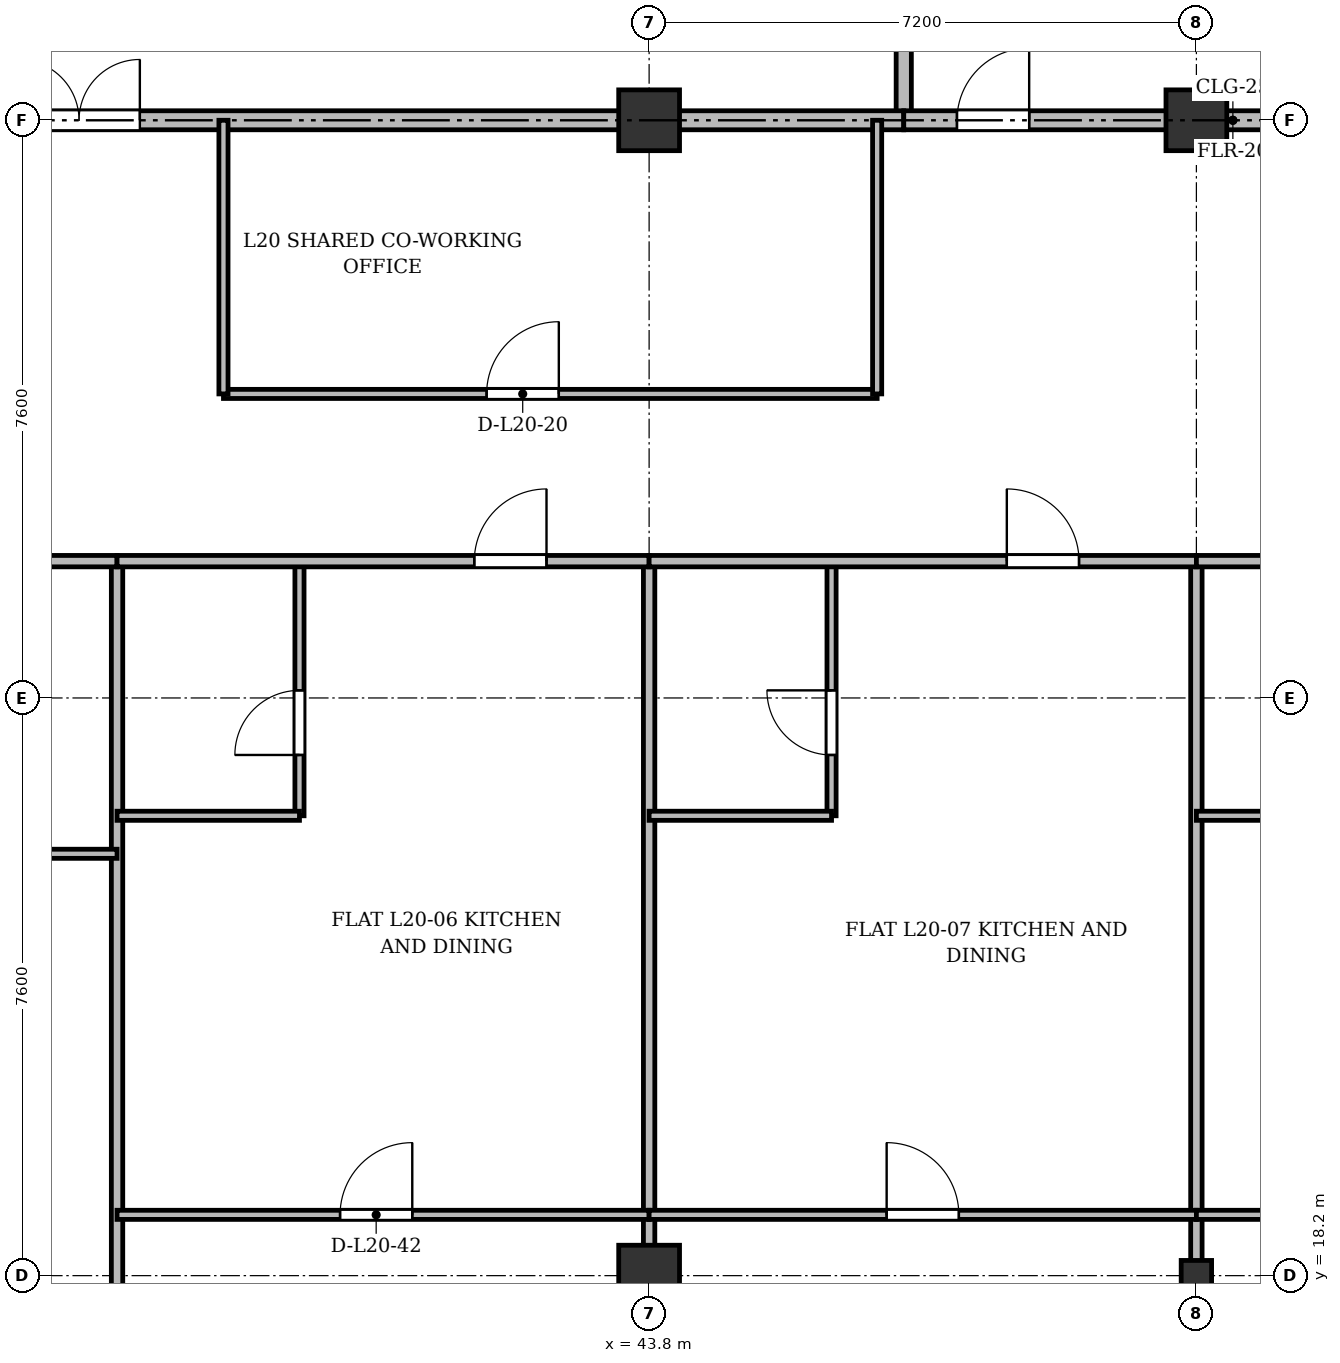
"""IFC4 building model, lengths in metres.
Left out: names, types, materials, properties, quantities, classifications, styles, units other than length and angle.
Written with IfcOpenShell. Run it as: python <this file> out.ifc"""

import sys

from ifc_helpers import new_model, si_unit, direction, frame, frame_2d, origin, origin_2d, place, context, subcontext, project, spatial, rectangle, i_section, extrude, source, transform, mapped, element, fill, save


model = new_model("IFC4")
c1 = context("Model", 3, precision=1e-05, world=origin(), true_north=direction((0.0, 1.0)))
c2 = subcontext(c1, "Body", "Model", "MODEL_VIEW")
j1 = project(units=[si_unit("LENGTHUNIT", "METRE"), si_unit("PLANEANGLEUNIT", "RADIAN")], contexts=[c1])
p1 = place(None, origin())
s1 = spatial("IfcSite", under=j1, at=p1, CompositionType="ELEMENT")
p2 = place(p1, origin())
s2 = spatial("IfcBuilding", under=s1, at=p2, CompositionType="ELEMENT")
p3 = place(p2, frame((0.0, 0.0, 81.7)))
s3 = spatial("IfcBuildingStorey", under=s2, at=p3, CompositionType="ELEMENT", Elevation=81.7)
m1 = source(origin(), c2, "Body", "SweptSolid", [
    extrude(rectangle(XDim=0.8, YDim=0.8, at=origin_2d()), origin(), (0.0, 0.0, 1.0), 3.6),
])
for number, where, z_axis, x_axis in (
    (1, (43.8, 18.2, 0.0), (0.0, 0.0, 1.0), (1.0, 0.0, 0.0)),
    (2, (43.8, 33.4, 0.0), (0.0, 0.0, 1.0), (1.0, 0.0, 0.0)),
):
    element("IfcColumn", number, at=place(p3, frame(where, z_axis=z_axis, x_axis=x_axis)), inside=s3, PredefinedType="COLUMN", context=c2, shape_type="MappedRepresentation", body=[
        mapped(m1, transform((0.0, 0.0, 0.0), x_axis=(1.0, 0.0, 0.0), y_axis=(0.0, 1.0, 0.0), z_axis=(0.0, 0.0, 1.0), scale=1.0)),
    ])
m2 = source(origin(), c2, "Body", "SweptSolid", [
    extrude(i_section(OverallWidth=0.4, OverallDepth=0.4, WebThickness=0.022, FlangeThickness=0.035, at=origin_2d()), origin(), (0.0, 0.0, 1.0), 3.6),
])
p4 = place(p3, frame((51.0, 18.2, 0.0), z_axis=(0.0, 0.0, 1.0), x_axis=(1.0, 0.0, 0.0)))
e3 = element("IfcColumn", 3, at=p4, inside=s3, PredefinedType="COLUMN", context=c2, shape_type="MappedRepresentation", body=[
    mapped(m2, transform((0.0, 0.0, 0.0), x_axis=(1.0, 0.0, 0.0), y_axis=(0.0, 1.0, 0.0), z_axis=(0.0, 0.0, 1.0), scale=1.0)),
])
p5 = place(p3, frame((51.0, 33.4, 0.0), z_axis=(0.0, 0.0, 1.0), x_axis=(1.0, 0.0, 0.0)))
e4 = element("IfcColumn", 4, at=p5, inside=s3, PredefinedType="COLUMN", context=c2, shape_type="MappedRepresentation", body=[
    mapped(m1, transform((0.0, 0.0, 0.0), x_axis=(1.0, 0.0, 0.0), y_axis=(0.0, 1.0, 0.0), z_axis=(0.0, 0.0, 1.0), scale=1.0)),
])
p6 = place(p3, frame((47.15, 33.4, 0.0), z_axis=(0.0, 0.0, 1.0), x_axis=(0.0, 1.0, 0.0)))
e5 = element("IfcWall", 5, at=p6, inside=s3, PredefinedType="SOLIDWALL", context=c2, shape_type="SweptSolid", body=[
    extrude(rectangle(XDim=11.3, YDim=0.2, at=frame_2d((5.65, 0.0))), origin(), (0.0, 0.0, 1.0), 2.752),
])
p7 = place(p3, frame((26.3, 33.4, 0.0), z_axis=(0.0, 0.0, 1.0), x_axis=(1.0, 0.0, 0.0)))
e6 = element("IfcWall", 6, at=p7, inside=s3, PredefinedType="PARTITIONING", context=c2, shape_type="SweptSolid", body=[
    extrude(rectangle(XDim=20.85, YDim=0.25, at=frame_2d((10.425, 0.0))), origin(), (0.0, 0.0, 1.0), 2.752),
])
p8 = place(p7, frame((9.2, 0.0, 0.0)))
e7 = element("IfcOpeningElement", 7, at=p8, cuts=e6, PredefinedType="OPENING", context=c2, shape_type="SweptSolid", body=[
    extrude(rectangle(XDim=1.6, YDim=2.2, at=frame_2d((0.8, 1.1))), frame((0.0, 0.135, 0.0), z_axis=(0.0, -1.0, 0.0), x_axis=(1.0, 0.0, 0.0)), (0.0, 0.0, 1.0), 0.27),
])
p9 = place(p3, frame((47.15, 33.4, 0.0), z_axis=(0.0, 0.0, 1.0), x_axis=(1.0, 0.0, 0.0)))
e8 = element("IfcWall", 8, at=p9, inside=s3, PredefinedType="PARTITIONING", context=c2, shape_type="SweptSolid", body=[
    extrude(rectangle(XDim=11.15, YDim=0.25, at=frame_2d((5.575, 0.0))), origin(), (0.0, 0.0, 1.0), 2.752),
])
p10 = place(p9, frame((0.7, 0.0, 0.0)))
e9 = element("IfcOpeningElement", 9, at=p10, cuts=e8, PredefinedType="OPENING", context=c2, shape_type="SweptSolid", body=[
    extrude(rectangle(XDim=0.95, YDim=2.15, at=frame_2d((0.475, 1.075))), frame((0.0, 0.135, 0.0), z_axis=(0.0, -1.0, 0.0), x_axis=(1.0, 0.0, 0.0)), (0.0, 0.0, 1.0), 0.27),
])
p11 = place(p9, frame((6.0, 0.0, 0.0)))
e10 = element("IfcOpeningElement", 10, at=p11, cuts=e8, PredefinedType="OPENING", context=c2, shape_type="SweptSolid", body=[
    extrude(rectangle(XDim=1.2, YDim=2.15, at=frame_2d((0.6, 1.075))), frame((0.0, 0.135, 0.0), z_axis=(0.0, -1.0, 0.0), x_axis=(1.0, 0.0, 0.0)), (0.0, 0.0, 1.0), 0.27),
])
p12 = place(p3, frame((38.2, 29.8, 0.0), z_axis=(0.0, 0.0, 1.0), x_axis=(1.0, 0.0, 0.0)))
e11 = element("IfcWall", 11, at=p12, inside=s3, PredefinedType="PARTITIONING", context=c2, shape_type="SweptSolid", body=[
    extrude(rectangle(XDim=8.6, YDim=0.12, at=frame_2d((4.3, 0.0))), origin(), (0.0, 0.0, 1.0), 2.84),
])
p13 = place(p12, frame((3.462, 0.0, 0.0)))
e12 = element("IfcOpeningElement", 12, at=p13, cuts=e11, PredefinedType="OPENING", context=c2, shape_type="SweptSolid", body=[
    extrude(rectangle(XDim=0.95, YDim=2.15, at=frame_2d((0.475, 1.075))), frame((0.0, 0.07, 0.0), z_axis=(0.0, -1.0, 0.0), x_axis=(1.0, 0.0, 0.0)), (0.0, 0.0, 1.0), 0.14),
])
for number, where, z_axis, x_axis in (
    (13, (38.2, 29.8, 0.0), (0.0, 0.0, 1.0), (0.0, 1.0, 0.0)),
    (14, (46.8, 29.8, 0.0), (0.0, 0.0, 1.0), (0.0, 1.0, 0.0)),
):
    element("IfcWall", number, at=place(p3, frame(where, z_axis=z_axis, x_axis=x_axis)), inside=s3, PredefinedType="PARTITIONING", context=c2, shape_type="SweptSolid", body=[
        extrude(rectangle(XDim=3.6, YDim=0.12, at=frame_2d((1.8, 0.0))), origin(), (0.0, 0.0, 1.0), 2.752),
    ])
p14 = place(p3, frame((36.8, 3.145, 0.0), z_axis=(0.0, 0.0, 1.0), x_axis=(0.0, 1.0, 0.0)))
e15 = element("IfcWall", 15, at=p14, inside=s3, PredefinedType="PARTITIONING", context=c2, shape_type="SweptSolid", body=[
    extrude(rectangle(XDim=24.455, YDim=0.15, at=frame_2d((12.228, 0.0))), origin(), (0.0, 0.0, 1.0), 2.752),
])
for number, where, z_axis, x_axis in (
    (16, (43.8, 3.145, 0.0), (0.0, 0.0, 1.0), (0.0, 1.0, 0.0)),
    (17, (51.0, 3.145, 0.0), (0.0, 0.0, 1.0), (0.0, 1.0, 0.0)),
):
    element("IfcWall", number, at=place(p3, frame(where, z_axis=z_axis, x_axis=x_axis)), inside=s3, PredefinedType="PARTITIONING", context=c2, shape_type="SweptSolid", body=[
        extrude(rectangle(XDim=24.455, YDim=0.15, at=frame_2d((12.228, 0.0))), origin(), (0.0, 0.0, 1.0), 2.84),
    ])
p15 = place(p3, frame((30.6, 27.6, 0.0), z_axis=(0.0, 0.0, 1.0), x_axis=(1.0, 0.0, 0.0)))
e18 = element("IfcWall", 18, at=p15, inside=s3, PredefinedType="PARTITIONING", context=c2, shape_type="SweptSolid", body=[
    extrude(rectangle(XDim=6.2, YDim=0.15, at=frame_2d((3.1, 0.0))), origin(), (0.0, 0.0, 1.0), 2.84),
])
p16 = place(p15, frame((2.625, 0.0, 0.0)))
e19 = element("IfcOpeningElement", 19, at=p16, cuts=e18, PredefinedType="OPENING", context=c2, shape_type="SweptSolid", body=[
    extrude(rectangle(XDim=0.95, YDim=2.15, at=frame_2d((0.475, 1.075))), frame((0.0, 0.085, 0.0), z_axis=(0.0, -1.0, 0.0), x_axis=(1.0, 0.0, 0.0)), (0.0, 0.0, 1.0), 0.17),
])
p17 = place(p3, frame((30.6, 23.75, 0.0), z_axis=(0.0, 0.0, 1.0), x_axis=(1.0, 0.0, 0.0)))
e20 = element("IfcWall", 20, at=p17, inside=s3, PredefinedType="PARTITIONING", context=c2, shape_type="SweptSolid", body=[
    extrude(rectangle(XDim=6.2, YDim=0.12, at=frame_2d((3.1, 0.0))), origin(), (0.0, 0.0, 1.0), 2.84),
])
p18 = place(p17, frame((2.625, 0.0, 0.0)))
e21 = element("IfcOpeningElement", 21, at=p18, cuts=e20, PredefinedType="OPENING", context=c2, shape_type="SweptSolid", body=[
    extrude(rectangle(XDim=0.95, YDim=2.15, at=frame_2d((0.475, 1.075))), frame((0.0, 0.07, 0.0), z_axis=(0.0, -1.0, 0.0), x_axis=(1.0, 0.0, 0.0)), (0.0, 0.0, 1.0), 0.14),
])
p19 = place(p3, frame((36.8, 19.0, 0.0), z_axis=(0.0, 0.0, 1.0), x_axis=(1.0, 0.0, 0.0)))
e22 = element("IfcWall", 22, at=p19, inside=s3, PredefinedType="PARTITIONING", context=c2, shape_type="SweptSolid", body=[
    extrude(rectangle(XDim=7.0, YDim=0.12, at=frame_2d((3.5, 0.0))), origin(), (0.0, 0.0, 1.0), 2.84),
])
p20 = place(p19, frame((2.934, 0.0, 0.0)))
e23 = element("IfcOpeningElement", 23, at=p20, cuts=e22, PredefinedType="OPENING", context=c2, shape_type="SweptSolid", body=[
    extrude(rectangle(XDim=0.95, YDim=2.15, at=frame_2d((0.475, 1.075))), frame((0.0, 0.07, 0.0), z_axis=(0.0, -1.0, 0.0), x_axis=(1.0, 0.0, 0.0)), (0.0, 0.0, 1.0), 0.14),
])
p21 = place(p3, frame((39.2, 24.25, 0.0), z_axis=(0.0, 0.0, 1.0), x_axis=(0.0, 1.0, 0.0)))
e24 = element("IfcWall", 24, at=p21, inside=s3, PredefinedType="PARTITIONING", context=c2, shape_type="SweptSolid", body=[
    extrude(rectangle(XDim=3.35, YDim=0.12, at=frame_2d((1.675, 0.0))), origin(), (0.0, 0.0, 1.0), 2.99),
])
p22 = place(p21, frame((0.8, 0.0, 0.0)))
e25 = element("IfcOpeningElement", 25, at=p22, cuts=e24, PredefinedType="OPENING", context=c2, shape_type="SweptSolid", body=[
    extrude(rectangle(XDim=0.85, YDim=2.1, at=frame_2d((0.425, 1.05))), frame((0.0, 0.07, 0.0), z_axis=(0.0, -1.0, 0.0), x_axis=(1.0, 0.0, 0.0)), (0.0, 0.0, 1.0), 0.14),
])
p23 = place(p3, frame((36.8, 24.25, 0.0), z_axis=(0.0, 0.0, 1.0), x_axis=(1.0, 0.0, 0.0)))
e26 = element("IfcWall", 26, at=p23, inside=s3, PredefinedType="PARTITIONING", context=c2, shape_type="SweptSolid", body=[
    extrude(rectangle(XDim=2.4, YDim=0.12, at=frame_2d((1.2, 0.0))), origin(), (0.0, 0.0, 1.0), 3.34),
])
p24 = place(p3, frame((36.8, 27.6, 0.0), z_axis=(0.0, 0.0, 1.0), x_axis=(1.0, 0.0, 0.0)))
e27 = element("IfcWall", 27, at=p24, inside=s3, PredefinedType="PARTITIONING", context=c2, shape_type="SweptSolid", body=[
    extrude(rectangle(XDim=7.0, YDim=0.15, at=frame_2d((3.5, 0.0))), origin(), (0.0, 0.0, 1.0), 2.84),
])
p25 = place(p24, frame((4.7, 0.0, 0.0)))
e28 = element("IfcOpeningElement", 28, at=p25, cuts=e27, PredefinedType="OPENING", context=c2, shape_type="SweptSolid", body=[
    extrude(rectangle(XDim=0.95, YDim=2.15, at=frame_2d((0.475, 1.075))), frame((0.0, 0.085, 0.0), z_axis=(0.0, -1.0, 0.0), x_axis=(1.0, 0.0, 0.0)), (0.0, 0.0, 1.0), 0.17),
])
p26 = place(p3, frame((43.8, 19.0, 0.0), z_axis=(0.0, 0.0, 1.0), x_axis=(1.0, 0.0, 0.0)))
e29 = element("IfcWall", 29, at=p26, inside=s3, PredefinedType="PARTITIONING", context=c2, shape_type="SweptSolid", body=[
    extrude(rectangle(XDim=7.2, YDim=0.12, at=frame_2d((3.6, 0.0))), origin(), (0.0, 0.0, 1.0), 2.84),
])
p27 = place(p26, frame((3.125, 0.0, 0.0)))
e30 = element("IfcOpeningElement", 30, at=p27, cuts=e29, PredefinedType="OPENING", context=c2, shape_type="SweptSolid", body=[
    extrude(rectangle(XDim=0.95, YDim=2.15, at=frame_2d((0.475, 1.075))), frame((0.0, 0.07, 0.0), z_axis=(0.0, -1.0, 0.0), x_axis=(1.0, 0.0, 0.0)), (0.0, 0.0, 1.0), 0.14),
])
p28 = place(p3, frame((46.2, 24.25, 0.0), z_axis=(0.0, 0.0, 1.0), x_axis=(0.0, 1.0, 0.0)))
e31 = element("IfcWall", 31, at=p28, inside=s3, PredefinedType="PARTITIONING", context=c2, shape_type="SweptSolid", body=[
    extrude(rectangle(XDim=3.35, YDim=0.12, at=frame_2d((1.675, 0.0))), origin(), (0.0, 0.0, 1.0), 2.99),
])
p29 = place(p28, frame((0.8, 0.0, 0.0)))
e32 = element("IfcOpeningElement", 32, at=p29, cuts=e31, PredefinedType="OPENING", context=c2, shape_type="SweptSolid", body=[
    extrude(rectangle(XDim=0.85, YDim=2.1, at=frame_2d((0.425, 1.05))), frame((0.0, 0.07, 0.0), z_axis=(0.0, -1.0, 0.0), x_axis=(1.0, 0.0, 0.0)), (0.0, 0.0, 1.0), 0.14),
])
p30 = place(p3, frame((43.8, 24.25, 0.0), z_axis=(0.0, 0.0, 1.0), x_axis=(1.0, 0.0, 0.0)))
e33 = element("IfcWall", 33, at=p30, inside=s3, PredefinedType="PARTITIONING", context=c2, shape_type="SweptSolid", body=[
    extrude(rectangle(XDim=2.4, YDim=0.12, at=frame_2d((1.2, 0.0))), origin(), (0.0, 0.0, 1.0), 2.84),
])
p31 = place(p3, frame((43.8, 27.6, 0.0), z_axis=(0.0, 0.0, 1.0), x_axis=(1.0, 0.0, 0.0)))
e34 = element("IfcWall", 34, at=p31, inside=s3, PredefinedType="PARTITIONING", context=c2, shape_type="SweptSolid", body=[
    extrude(rectangle(XDim=7.2, YDim=0.15, at=frame_2d((3.6, 0.0))), origin(), (0.0, 0.0, 1.0), 2.84),
])
p32 = place(p31, frame((4.706, 0.0, 0.0)))
e35 = element("IfcOpeningElement", 35, at=p32, cuts=e34, PredefinedType="OPENING", context=c2, shape_type="SweptSolid", body=[
    extrude(rectangle(XDim=0.95, YDim=2.15, at=frame_2d((0.475, 1.075))), frame((0.0, 0.085, 0.0), z_axis=(0.0, -1.0, 0.0), x_axis=(1.0, 0.0, 0.0)), (0.0, 0.0, 1.0), 0.17),
])
p33 = place(p3, frame((51.0, 19.0, 0.0), z_axis=(0.0, 0.0, 1.0), x_axis=(1.0, 0.0, 0.0)))
e36 = element("IfcWall", 36, at=p33, inside=s3, PredefinedType="PARTITIONING", context=c2, shape_type="SweptSolid", body=[
    extrude(rectangle(XDim=7.8, YDim=0.12, at=frame_2d((3.9, 0.0))), origin(), (0.0, 0.0, 1.0), 2.84),
])
p34 = place(p33, frame((3.333, 0.0, 0.0)))
e37 = element("IfcOpeningElement", 37, at=p34, cuts=e36, PredefinedType="OPENING", context=c2, shape_type="SweptSolid", body=[
    extrude(rectangle(XDim=0.95, YDim=2.15, at=frame_2d((0.475, 1.075))), frame((0.0, 0.07, 0.0), z_axis=(0.0, -1.0, 0.0), x_axis=(1.0, 0.0, 0.0)), (0.0, 0.0, 1.0), 0.14),
])
p35 = place(p3, frame((51.0, 24.25, 0.0), z_axis=(0.0, 0.0, 1.0), x_axis=(1.0, 0.0, 0.0)))
e38 = element("IfcWall", 38, at=p35, inside=s3, PredefinedType="PARTITIONING", context=c2, shape_type="SweptSolid", body=[
    extrude(rectangle(XDim=2.4, YDim=0.12, at=frame_2d((1.2, 0.0))), origin(), (0.0, 0.0, 1.0), 2.84),
])
p36 = place(p3, frame((51.0, 27.6, 0.0), z_axis=(0.0, 0.0, 1.0), x_axis=(1.0, 0.0, 0.0)))
e39 = element("IfcWall", 39, at=p36, inside=s3, PredefinedType="PARTITIONING", context=c2, shape_type="SweptSolid", body=[
    extrude(rectangle(XDim=7.8, YDim=0.15, at=frame_2d((3.9, 0.0))), origin(), (0.0, 0.0, 1.0), 2.84),
])
p37 = place(p36, frame((5.172, 0.0, 0.0)))
e40 = element("IfcOpeningElement", 40, at=p37, cuts=e39, PredefinedType="OPENING", context=c2, shape_type="SweptSolid", body=[
    extrude(rectangle(XDim=0.95, YDim=2.15, at=frame_2d((0.475, 1.075))), frame((0.0, 0.085, 0.0), z_axis=(0.0, -1.0, 0.0), x_axis=(1.0, 0.0, 0.0)), (0.0, 0.0, 1.0), 0.17),
])
m3 = source(origin(), c2, "Body", "SweptSolid", [
    extrude(rectangle(XDim=1.6, YDim=2.2, at=frame_2d((0.8, 1.1))), frame((0.0, 0.025, 0.0), z_axis=(0.0, -1.0, 0.0), x_axis=(1.0, 0.0, 0.0)), (0.0, 0.0, 1.0), 0.05),
])
p38 = place(p8, origin())
e41 = element("IfcDoor", 41, at=p38, inside=s3, OperationType="DOUBLE_DOOR_SINGLE_SWING", PredefinedType="DOOR", context=c2, shape_type="MappedRepresentation", body=[
    mapped(m3, transform((0.0, 0.0, 0.0), x_axis=(1.0, 0.0, 0.0), y_axis=(0.0, 1.0, 0.0), z_axis=(0.0, 0.0, 1.0), scale=1.0)),
])
fill(e7, e41)
m4 = source(origin(), c2, "Body", "SweptSolid", [
    extrude(rectangle(XDim=0.95, YDim=2.15, at=frame_2d((0.475, 1.075))), frame((0.0, 0.025, 0.0), z_axis=(0.0, -1.0, 0.0), x_axis=(1.0, 0.0, 0.0)), (0.0, 0.0, 1.0), 0.05),
])
p39 = place(p10, origin())
e42 = element("IfcDoor", 42, at=p39, inside=s3, OperationType="SINGLE_SWING_RIGHT", PredefinedType="DOOR", context=c2, shape_type="MappedRepresentation", body=[
    mapped(m4, transform((0.0, 0.0, 0.0), x_axis=(1.0, 0.0, 0.0), y_axis=(0.0, 1.0, 0.0), z_axis=(0.0, 0.0, 1.0), scale=1.0)),
])
fill(e9, e42)
p40 = place(p13, origin())
e43 = element("IfcDoor", 43, at=p40, inside=s3, OperationType="SINGLE_SWING_RIGHT", PredefinedType="DOOR", context=c2, shape_type="MappedRepresentation", body=[
    mapped(m4, transform((0.0, 0.0, 0.0), x_axis=(1.0, 0.0, 0.0), y_axis=(0.0, 1.0, 0.0), z_axis=(0.0, 0.0, 1.0), scale=1.0)),
])
fill(e12, e43)
p41 = place(p20, origin())
e44 = element("IfcDoor", 44, at=p41, inside=s3, OperationType="SINGLE_SWING_RIGHT", PredefinedType="DOOR", context=c2, shape_type="MappedRepresentation", body=[
    mapped(m4, transform((0.0, 0.0, 0.0), x_axis=(1.0, 0.0, 0.0), y_axis=(0.0, 1.0, 0.0), z_axis=(0.0, 0.0, 1.0), scale=1.0)),
])
fill(e23, e44)
m5 = source(origin(), c2, "Body", "SweptSolid", [
    extrude(rectangle(XDim=0.85, YDim=2.1, at=frame_2d((0.425, 1.05))), frame((0.0, 0.025, 0.0), z_axis=(0.0, -1.0, 0.0), x_axis=(1.0, 0.0, 0.0)), (0.0, 0.0, 1.0), 0.05),
])
p42 = place(p22, origin())
e45 = element("IfcDoor", 45, at=p42, inside=s3, OperationType="SINGLE_SWING_LEFT", PredefinedType="DOOR", context=c2, shape_type="MappedRepresentation", body=[
    mapped(m5, transform((0.0, 0.0, 0.0), x_axis=(1.0, 0.0, 0.0), y_axis=(0.0, 1.0, 0.0), z_axis=(0.0, 0.0, 1.0), scale=1.0)),
])
fill(e25, e45)
p43 = place(p25, origin())
e46 = element("IfcDoor", 46, at=p43, inside=s3, OperationType="SINGLE_SWING_RIGHT", PredefinedType="DOOR", context=c2, shape_type="MappedRepresentation", body=[
    mapped(m4, transform((0.0, 0.0, 0.0), x_axis=(1.0, 0.0, 0.0), y_axis=(0.0, 1.0, 0.0), z_axis=(0.0, 0.0, 1.0), scale=1.0)),
])
fill(e28, e46)
p44 = place(p27, origin())
e47 = element("IfcDoor", 47, at=p44, inside=s3, OperationType="SINGLE_SWING_LEFT", PredefinedType="DOOR", context=c2, shape_type="MappedRepresentation", body=[
    mapped(m4, transform((0.0, 0.0, 0.0), x_axis=(1.0, 0.0, 0.0), y_axis=(0.0, 1.0, 0.0), z_axis=(0.0, 0.0, 1.0), scale=1.0)),
])
fill(e30, e47)
p45 = place(p29, origin())
e48 = element("IfcDoor", 48, at=p45, inside=s3, OperationType="SINGLE_SWING_RIGHT", PredefinedType="DOOR", context=c2, shape_type="MappedRepresentation", body=[
    mapped(m5, transform((0.0, 0.0, 0.0), x_axis=(1.0, 0.0, 0.0), y_axis=(0.0, 1.0, 0.0), z_axis=(0.0, 0.0, 1.0), scale=1.0)),
])
fill(e32, e48)
p46 = place(p32, origin())
e49 = element("IfcDoor", 49, at=p46, inside=s3, OperationType="SINGLE_SWING_LEFT", PredefinedType="DOOR", context=c2, shape_type="MappedRepresentation", body=[
    mapped(m4, transform((0.0, 0.0, 0.0), x_axis=(1.0, 0.0, 0.0), y_axis=(0.0, 1.0, 0.0), z_axis=(0.0, 0.0, 1.0), scale=1.0)),
])
fill(e35, e49)
save(model, sys.argv[1])
